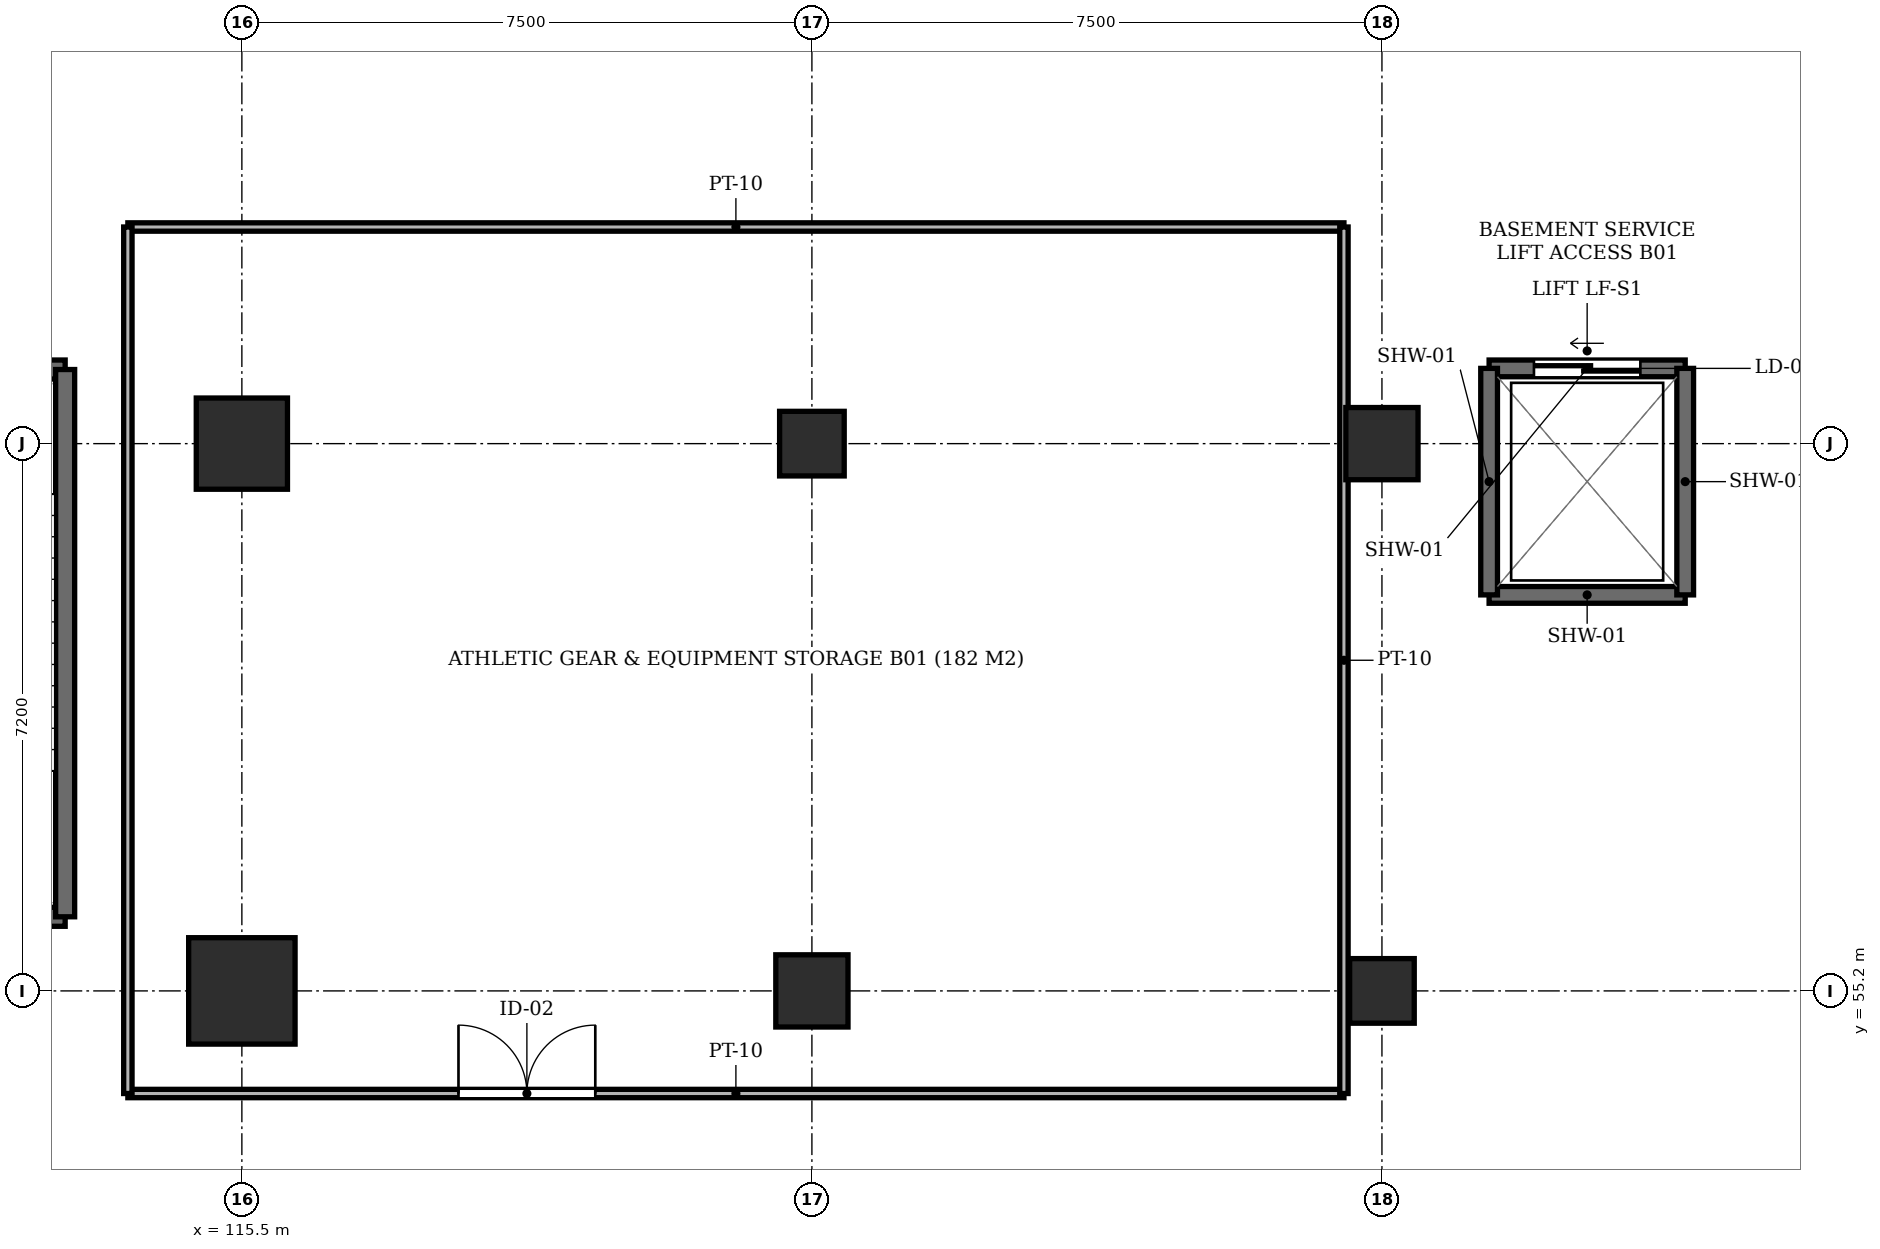
"""IFC4 building model, lengths in metres.
Left out: names, types, materials, properties, quantities, classifications, styles, units other than length and angle.
Written with IfcOpenShell. Run it as: python <this file> out.ifc"""

import sys

from ifc_helpers import new_model, si_unit, direction, frame, frame_2d, origin, origin_2d, place, context, subcontext, project, spatial, rectangle, extrude, element, fill, save


model = new_model("IFC4")
c1 = context("Model", 3, precision=1e-05, world=origin(), true_north=direction((0.0, 1.0)))
c2 = subcontext(c1, "Body", "Model", "MODEL_VIEW")
j1 = project(units=[si_unit("LENGTHUNIT", "METRE"), si_unit("PLANEANGLEUNIT", "RADIAN")], contexts=[c1])
p1 = place(None, origin())
s1 = spatial("IfcSite", under=j1, at=p1, CompositionType="ELEMENT")
p2 = place(p1, origin())
s2 = spatial("IfcBuilding", under=s1, at=p2, CompositionType="ELEMENT")
p3 = place(p2, frame((0.0, 0.0, -4.5)))
s3 = spatial("IfcBuildingStorey", under=s2, at=p3, CompositionType="ELEMENT", Elevation=-4.5)
p4 = place(p3, frame((115.5, 55.2, -0.32), z_axis=(0.0, 0.0, 1.0), x_axis=(1.0, 0.0, 0.0)))
e1 = element("IfcColumn", 1, at=p4, inside=s3, PredefinedType="COLUMN", context=c2, shape_type="SweptSolid", body=[
    extrude(rectangle(XDim=1.4, YDim=1.4, at=origin_2d()), origin(), (0.0, 0.0, 1.0), 4.47),
])
p5 = place(p3, frame((115.5, 62.4, -0.32), z_axis=(0.0, 0.0, 1.0), x_axis=(1.0, 0.0, 0.0)))
e2 = element("IfcColumn", 2, at=p5, inside=s3, PredefinedType="COLUMN", context=c2, shape_type="SweptSolid", body=[
    extrude(rectangle(XDim=1.2, YDim=1.2, at=origin_2d()), origin(), (0.0, 0.0, 1.0), 4.47),
])
p6 = place(p3, frame((123.0, 55.2, -0.32), z_axis=(0.0, 0.0, 1.0), x_axis=(1.0, 0.0, 0.0)))
e3 = element("IfcColumn", 3, at=p6, inside=s3, PredefinedType="COLUMN", context=c2, shape_type="SweptSolid", body=[
    extrude(rectangle(XDim=0.95, YDim=0.95, at=origin_2d()), origin(), (0.0, 0.0, 1.0), 4.47),
])
for number, where, z_axis, x_axis in (
    (4, (123.0, 62.4, -0.32), (0.0, 0.0, 1.0), (1.0, 0.0, 0.0)),
    (5, (130.5, 55.2, -0.32), (0.0, 0.0, 1.0), (1.0, 0.0, 0.0)),
):
    element("IfcColumn", number, at=place(p3, frame(where, z_axis=z_axis, x_axis=x_axis)), inside=s3, PredefinedType="COLUMN", context=c2, shape_type="SweptSolid", body=[
        extrude(rectangle(XDim=0.85, YDim=0.85, at=origin_2d()), origin(), (0.0, 0.0, 1.0), 4.47),
    ])
p7 = place(p3, frame((130.5, 62.4, -0.32), z_axis=(0.0, 0.0, 1.0), x_axis=(1.0, 0.0, 0.0)))
e6 = element("IfcColumn", 6, at=p7, inside=s3, PredefinedType="COLUMN", context=c2, shape_type="SweptSolid", body=[
    extrude(rectangle(XDim=0.95, YDim=0.95, at=origin_2d()), origin(), (0.0, 0.0, 1.0), 4.47),
])
p8 = place(p3, frame((108.925, 56.175, 0.0), z_axis=(0.0, 0.0, 1.0), x_axis=(1.0, 0.0, 0.0)))
e7 = element("IfcWall", 7, at=p8, inside=s3, PredefinedType="SHEAR", context=c2, shape_type="SweptSolid", body=[
    extrude(rectangle(XDim=4.25, YDim=0.25, at=frame_2d((2.125, 0.0))), origin(), (0.0, 0.0, 1.0), 4.15),
])
p9 = place(p3, frame((113.175, 63.375, 0.0), z_axis=(0.0, 0.0, 1.0), x_axis=(-1.0, 0.0, 0.0)))
e8 = element("IfcWall", 8, at=p9, inside=s3, PredefinedType="SHEAR", context=c2, shape_type="SweptSolid", body=[
    extrude(rectangle(XDim=4.25, YDim=0.25, at=frame_2d((2.125, 0.0))), origin(), (0.0, 0.0, 1.0), 4.15),
])
p10 = place(p9, frame((1.525, 0.0, 0.0)))
e9 = element("IfcOpeningElement", 9, at=p10, cuts=e8, PredefinedType="OPENING", context=c2, shape_type="SweptSolid", body=[
    extrude(rectangle(XDim=1.2, YDim=2.2, at=frame_2d((0.6, 1.1))), frame((0.0, 0.137, 0.0), z_axis=(0.0, -1.0, 0.0), x_axis=(1.0, 0.0, 0.0)), (0.0, 0.0, 1.0), 0.274),
])
p11 = place(p3, frame((113.175, 56.175, 0.0), z_axis=(0.0, 0.0, 1.0), x_axis=(0.0, 1.0, 0.0)))
e10 = element("IfcWall", 10, at=p11, inside=s3, PredefinedType="SHEAR", context=c2, shape_type="SweptSolid", body=[
    extrude(rectangle(XDim=7.2, YDim=0.25, at=frame_2d((3.6, 0.0))), origin(), (0.0, 0.0, 1.0), 4.15),
])
p12 = place(p3, frame((131.91, 60.41, 0.0), z_axis=(0.0, 0.0, 1.0), x_axis=(1.0, 0.0, 0.0)))
e11 = element("IfcWall", 11, at=p12, inside=s3, PredefinedType="SHEAR", context=c2, shape_type="SweptSolid", body=[
    extrude(rectangle(XDim=2.58, YDim=0.22, at=frame_2d((1.29, 0.0))), origin(), (0.0, 0.0, 1.0), 4.15),
])
p13 = place(p3, frame((134.49, 63.39, 0.0), z_axis=(0.0, 0.0, 1.0), x_axis=(-1.0, 0.0, 0.0)))
e12 = element("IfcWall", 12, at=p13, inside=s3, PredefinedType="SHEAR", context=c2, shape_type="SweptSolid", body=[
    extrude(rectangle(XDim=2.58, YDim=0.22, at=frame_2d((1.29, 0.0))), origin(), (0.0, 0.0, 1.0), 4.15),
])
p14 = place(p13, frame((0.59, 0.0, 0.0)))
e13 = element("IfcOpeningElement", 13, at=p14, cuts=e12, PredefinedType="OPENING", context=c2, shape_type="SweptSolid", body=[
    extrude(rectangle(XDim=1.4, YDim=2.3, at=frame_2d((0.7, 1.15))), frame((0.0, 0.122, 0.0), z_axis=(0.0, -1.0, 0.0), x_axis=(1.0, 0.0, 0.0)), (0.0, 0.0, 1.0), 0.244),
])
for number, where, z_axis, x_axis in (
    (14, (131.91, 63.39, 0.0), (0.0, 0.0, 1.0), (0.0, -1.0, 0.0)),
    (15, (134.49, 60.41, 0.0), (0.0, 0.0, 1.0), (0.0, 1.0, 0.0)),
):
    element("IfcWall", number, at=place(p3, frame(where, z_axis=z_axis, x_axis=x_axis)), inside=s3, PredefinedType="SHEAR", context=c2, shape_type="SweptSolid", body=[
        extrude(rectangle(XDim=2.98, YDim=0.22, at=frame_2d((1.49, 0.0))), origin(), (0.0, 0.0, 1.0), 4.15),
    ])
p15 = place(p3, frame((114.0, 53.85, 0.0), z_axis=(0.0, 0.0, 1.0), x_axis=(1.0, 0.0, 0.0)))
e16 = element("IfcWall", 16, at=p15, inside=s3, PredefinedType="PARTITIONING", context=c2, shape_type="SweptSolid", body=[
    extrude(rectangle(XDim=16.0, YDim=0.11, at=frame_2d((8.0, 0.0))), origin(), (0.0, 0.0, 1.0), 3.78),
])
p16 = place(p15, frame((4.35, 0.0, 0.0)))
e17 = element("IfcOpeningElement", 17, at=p16, cuts=e16, PredefinedType="OPENING", context=c2, shape_type="SweptSolid", body=[
    extrude(rectangle(XDim=1.8, YDim=2.25, at=frame_2d((0.9, 1.125))), frame((0.0, 0.067, 0.0), z_axis=(0.0, -1.0, 0.0), x_axis=(1.0, 0.0, 0.0)), (0.0, 0.0, 1.0), 0.134),
])
p17 = place(p3, frame((114.0, 65.25, 0.0), z_axis=(0.0, 0.0, 1.0), x_axis=(1.0, 0.0, 0.0)))
e18 = element("IfcWall", 18, at=p17, inside=s3, PredefinedType="PARTITIONING", context=c2, shape_type="SweptSolid", body=[
    extrude(rectangle(XDim=16.0, YDim=0.11, at=frame_2d((8.0, 0.0))), origin(), (0.0, 0.0, 1.0), 3.78),
])
for number, where, z_axis, x_axis in (
    (19, (114.0, 53.85, 0.0), (0.0, 0.0, 1.0), (0.0, 1.0, 0.0)),
    (20, (130.0, 53.85, 0.0), (0.0, 0.0, 1.0), (0.0, 1.0, 0.0)),
):
    element("IfcWall", number, at=place(p3, frame(where, z_axis=z_axis, x_axis=x_axis)), inside=s3, PredefinedType="PARTITIONING", context=c2, shape_type="SweptSolid", body=[
        extrude(rectangle(XDim=11.4, YDim=0.11, at=frame_2d((5.7, 0.0))), origin(), (0.0, 0.0, 1.0), 3.78),
    ])
p18 = place(p14, origin())
e21 = element("IfcDoor", 21, at=p18, inside=s3, OperationType="SLIDING_TO_RIGHT", PredefinedType="DOOR", context=c2, shape_type="SweptSolid", body=[
    extrude(rectangle(XDim=1.4, YDim=2.3, at=frame_2d((0.7, 1.15))), frame((0.0, 0.025, 0.0), z_axis=(0.0, -1.0, 0.0), x_axis=(1.0, 0.0, 0.0)), (0.0, 0.0, 1.0), 0.05),
])
fill(e13, e21)
p19 = place(p16, origin())
e22 = element("IfcDoor", 22, at=p19, inside=s3, OperationType="DOUBLE_DOOR_SINGLE_SWING", PredefinedType="DOOR", context=c2, shape_type="SweptSolid", body=[
    extrude(rectangle(XDim=1.8, YDim=2.25, at=frame_2d((0.9, 1.125))), frame((0.0, 0.025, 0.0), z_axis=(0.0, -1.0, 0.0), x_axis=(1.0, 0.0, 0.0)), (0.0, 0.0, 1.0), 0.05),
])
fill(e17, e22)
save(model, sys.argv[1])
